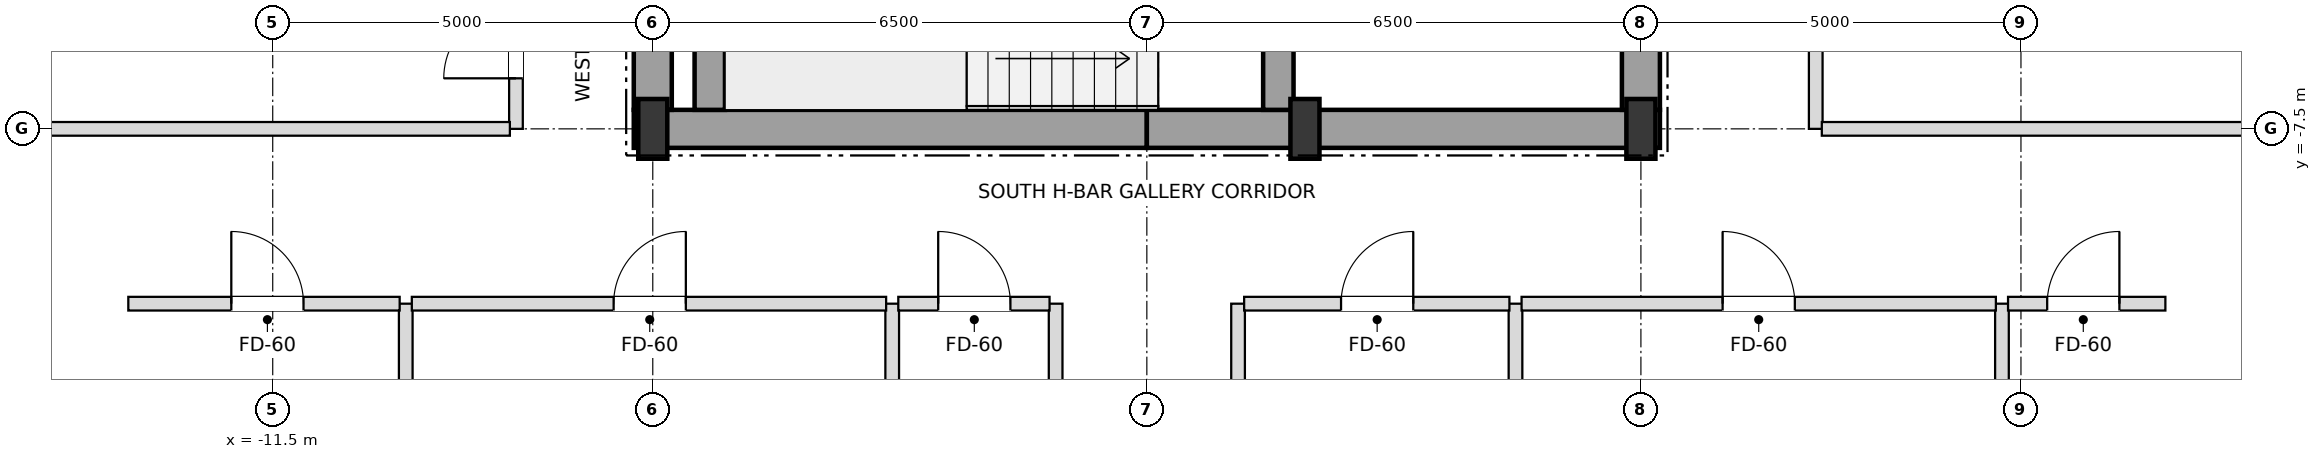
"""IFC4 building model, lengths in metres.
Left out: names, types, materials, properties, quantities, classifications, styles, units other than length and angle.
Written with IfcOpenShell. Run it as: python <this file> out.ifc"""

import sys

from ifc_helpers import new_model, si_unit, direction, frame, frame_2d, origin, origin_2d, place, context, subcontext, project, spatial, rectangle, i_section, extrude, element, fill, save


model = new_model("IFC4")
c1 = context("Model", 3, precision=1e-05, world=origin(), true_north=direction((0.0, 1.0)))
c2 = subcontext(c1, "Body", "Model", "MODEL_VIEW")
j1 = project(units=[si_unit("LENGTHUNIT", "METRE"), si_unit("PLANEANGLEUNIT", "RADIAN")], contexts=[c1])
p1 = place(None, origin())
s1 = spatial("IfcSite", under=j1, at=p1, CompositionType="ELEMENT")
p2 = place(p1, origin())
s2 = spatial("IfcBuilding", under=s1, at=p2, CompositionType="ELEMENT")
p3 = place(p2, frame((0.0, 0.0, 205.2)))
s3 = spatial("IfcBuildingStorey", under=s2, at=p3, CompositionType="ELEMENT", Elevation=205.2)
for number, where, z_axis, x_axis in (
    (1, (-6.5, -7.5, 0.0), (0.0, 0.0, 1.0), (1.0, 0.0, 0.0)),
    (2, (2.08, -7.5, 0.0), (0.0, 0.0, 1.0), (1.0, 0.0, 0.0)),
    (3, (6.5, -7.5, 0.0), (0.0, 0.0, 1.0), (1.0, 0.0, 0.0)),
):
    element("IfcColumn", number, at=place(p3, frame(where, z_axis=z_axis, x_axis=x_axis)), inside=s3, PredefinedType="COLUMN", context=c2, shape_type="SweptSolid", body=[
        extrude(i_section(OverallWidth=0.382, OverallDepth=0.786, WebThickness=0.02, FlangeThickness=0.033, at=origin_2d()), origin(), (0.0, 0.0, 1.0), 3.6),
    ])
for number, where, z_axis, x_axis in (
    (4, (-6.75, -7.5, 0.0), (0.0, 0.0, 1.0), (1.0, 0.0, 0.0)),
    (5, (0.0, -7.5, 0.0), (0.0, 0.0, 1.0), (1.0, 0.0, 0.0)),
):
    element("IfcWall", number, at=place(p3, frame(where, z_axis=z_axis, x_axis=x_axis)), inside=s3, PredefinedType="SHEAR", context=c2, shape_type="SweptSolid", body=[
        extrude(rectangle(XDim=6.75, YDim=0.5, at=frame_2d((3.375, 0.0))), origin(), (0.0, 0.0, 1.0), 3.38),
    ])
p4 = place(p3, frame((-6.5, -7.25, 0.0), z_axis=(0.0, 0.0, 1.0), x_axis=(0.0, 1.0, 0.0)))
e6 = element("IfcWall", 6, at=p4, inside=s3, PredefinedType="SHEAR", context=c2, shape_type="SweptSolid", body=[
    extrude(rectangle(XDim=3.55, YDim=0.5, at=frame_2d((1.775, 0.0))), origin(), (0.0, 0.0, 1.0), 3.38),
])
p5 = place(p3, frame((6.5, -7.25, 0.0), z_axis=(0.0, 0.0, 1.0), x_axis=(0.0, 1.0, 0.0)))
e7 = element("IfcWall", 7, at=p5, inside=s3, PredefinedType="SHEAR", context=c2, shape_type="SweptSolid", body=[
    extrude(rectangle(XDim=5.75, YDim=0.5, at=frame_2d((2.875, 0.0))), origin(), (0.0, 0.0, 1.0), 3.38),
])
p6 = place(p5, frame((0.85, 0.0, 0.0)))
e8 = element("IfcOpeningElement", 8, at=p6, cuts=e7, PredefinedType="OPENING", context=c2, shape_type="SweptSolid", body=[
    extrude(rectangle(XDim=1.05, YDim=2.15, at=frame_2d((0.525, 1.075))), frame((0.0, 0.26, 0.0), z_axis=(0.0, -1.0, 0.0), x_axis=(1.0, 0.0, 0.0)), (0.0, 0.0, 1.0), 0.52),
])
p7 = place(p3, frame((-5.75, -7.25, 0.0), z_axis=(0.0, 0.0, 1.0), x_axis=(0.0, 1.0, 0.0)))
e9 = element("IfcWall", 9, at=p7, inside=s3, PredefinedType="SHEAR", context=c2, shape_type="SweptSolid", body=[
    extrude(rectangle(XDim=2.9, YDim=0.4, at=frame_2d((1.45, 0.0))), origin(), (0.0, 0.0, 1.0), 3.38),
])
p8 = place(p3, frame((1.73, -7.25, 0.0), z_axis=(0.0, 0.0, 1.0), x_axis=(0.0, 1.0, 0.0)))
e10 = element("IfcWall", 10, at=p8, inside=s3, PredefinedType="SHEAR", context=c2, shape_type="SweptSolid", body=[
    extrude(rectangle(XDim=3.3, YDim=0.4, at=frame_2d((1.65, 0.0))), origin(), (0.0, 0.0, 1.0), 3.38),
])
p9 = place(p8, frame((0.9, 0.0, 0.0)))
e11 = element("IfcOpeningElement", 11, at=p9, cuts=e10, PredefinedType="OPENING", context=c2, shape_type="SweptSolid", body=[
    extrude(rectangle(XDim=1.05, YDim=2.15, at=frame_2d((0.525, 1.075))), frame((0.0, 0.21, 0.0), z_axis=(0.0, -1.0, 0.0), x_axis=(1.0, 0.0, 0.0)), (0.0, 0.0, 1.0), 0.42),
])
p10 = place(p3, frame((-9.75, -21.4, 0.0), z_axis=(0.0, 0.0, 1.0), x_axis=(0.0, 1.0, 0.0)))
e12 = element("IfcWall", 12, at=p10, inside=s3, PredefinedType="PARTITIONING", context=c2, shape_type="SweptSolid", body=[
    extrude(rectangle(XDim=11.6, YDim=0.18, at=frame_2d((5.8, 0.0))), origin(), (0.0, 0.0, 1.0), 2.826),
])
p11 = place(p3, frame((-8.3, -7.5, 0.0), z_axis=(0.0, 0.0, 1.0), x_axis=(0.0, 1.0, 0.0)))
e13 = element("IfcWall", 13, at=p11, inside=s3, PredefinedType="PARTITIONING", context=c2, shape_type="SweptSolid", body=[
    extrude(rectangle(XDim=15.0, YDim=0.18, at=frame_2d((7.5, 0.0))), origin(), (0.0, 0.0, 1.0), 3.38),
])
p12 = place(p11, frame((0.665, 0.0, 0.0)))
e14 = element("IfcOpeningElement", 14, at=p12, cuts=e13, PredefinedType="OPENING", context=c2, shape_type="SweptSolid", body=[
    extrude(rectangle(XDim=0.95, YDim=2.15, at=frame_2d((0.475, 1.075))), frame((0.0, 0.1, 0.0), z_axis=(0.0, -1.0, 0.0), x_axis=(1.0, 0.0, 0.0)), (0.0, 0.0, 1.0), 0.2),
])
p13 = place(p11, frame((2.665, 0.0, 0.0)))
e15 = element("IfcOpeningElement", 15, at=p13, cuts=e13, PredefinedType="OPENING", context=c2, shape_type="SweptSolid", body=[
    extrude(rectangle(XDim=0.95, YDim=2.15, at=frame_2d((0.475, 1.075))), frame((0.0, 0.1, 0.0), z_axis=(0.0, -1.0, 0.0), x_axis=(1.0, 0.0, 0.0)), (0.0, 0.0, 1.0), 0.2),
])
for number, where, z_axis, x_axis in (
    (16, (-3.35, -21.4, 0.0), (0.0, 0.0, 1.0), (0.0, 1.0, 0.0)),
    (17, (-1.2, -21.4, 0.0), (0.0, 0.0, 1.0), (0.0, 1.0, 0.0)),
    (18, (1.2, -21.4, 0.0), (0.0, 0.0, 1.0), (0.0, 1.0, 0.0)),
    (19, (4.85, -21.4, 0.0), (0.0, 0.0, 1.0), (0.0, 1.0, 0.0)),
):
    element("IfcWall", number, at=place(p3, frame(where, z_axis=z_axis, x_axis=x_axis)), inside=s3, PredefinedType="PARTITIONING", context=c2, shape_type="SweptSolid", body=[
        extrude(rectangle(XDim=11.6, YDim=0.18, at=frame_2d((5.8, 0.0))), origin(), (0.0, 0.0, 1.0), 2.826),
    ])
p14 = place(p3, frame((8.8, -7.5, 0.0), z_axis=(0.0, 0.0, 1.0), x_axis=(0.0, 1.0, 0.0)))
e20 = element("IfcWall", 20, at=p14, inside=s3, PredefinedType="PARTITIONING", context=c2, shape_type="SweptSolid", body=[
    extrude(rectangle(XDim=15.0, YDim=0.18, at=frame_2d((7.5, 0.0))), origin(), (0.0, 0.0, 1.0), 3.38),
])
p15 = place(p14, frame((2.075, 0.0, 0.0)))
e21 = element("IfcOpeningElement", 21, at=p15, cuts=e20, PredefinedType="OPENING", context=c2, shape_type="SweptSolid", body=[
    extrude(rectangle(XDim=0.95, YDim=2.15, at=frame_2d((0.475, 1.075))), frame((0.0, 0.1, 0.0), z_axis=(0.0, -1.0, 0.0), x_axis=(1.0, 0.0, 0.0)), (0.0, 0.0, 1.0), 0.2),
])
p16 = place(p14, frame((8.325, 0.0, 0.0)))
e22 = element("IfcOpeningElement", 22, at=p16, cuts=e20, PredefinedType="OPENING", context=c2, shape_type="SweptSolid", body=[
    extrude(rectangle(XDim=0.95, YDim=2.15, at=frame_2d((0.475, 1.075))), frame((0.0, 0.1, 0.0), z_axis=(0.0, -1.0, 0.0), x_axis=(1.0, 0.0, 0.0)), (0.0, 0.0, 1.0), 0.2),
])
p17 = place(p14, frame((13.275, 0.0, 0.0)))
e23 = element("IfcOpeningElement", 23, at=p17, cuts=e20, PredefinedType="OPENING", context=c2, shape_type="SweptSolid", body=[
    extrude(rectangle(XDim=0.95, YDim=2.15, at=frame_2d((0.475, 1.075))), frame((0.0, 0.1, 0.0), z_axis=(0.0, -1.0, 0.0), x_axis=(1.0, 0.0, 0.0)), (0.0, 0.0, 1.0), 0.2),
])
p18 = place(p3, frame((11.25, -21.4, 0.0), z_axis=(0.0, 0.0, 1.0), x_axis=(0.0, 1.0, 0.0)))
e24 = element("IfcWall", 24, at=p18, inside=s3, PredefinedType="PARTITIONING", context=c2, shape_type="SweptSolid", body=[
    extrude(rectangle(XDim=11.6, YDim=0.18, at=frame_2d((5.8, 0.0))), origin(), (0.0, 0.0, 1.0), 2.826),
])
p19 = place(p3, frame((-13.4, -9.8, 0.0), z_axis=(0.0, 0.0, 1.0), x_axis=(1.0, 0.0, 0.0)))
e25 = element("IfcWall", 25, at=p19, inside=s3, PredefinedType="PARTITIONING", context=c2, shape_type="SweptSolid", body=[
    extrude(rectangle(XDim=3.57, YDim=0.18, at=frame_2d((1.785, 0.0))), origin(), (0.0, 0.0, 1.0), 3.38),
])
p20 = place(p19, frame((1.355, 0.0, 0.0)))
e26 = element("IfcOpeningElement", 26, at=p20, cuts=e25, PredefinedType="OPENING", context=c2, shape_type="SweptSolid", body=[
    extrude(rectangle(XDim=0.95, YDim=2.15, at=frame_2d((0.475, 1.075))), frame((0.0, 0.1, 0.0), z_axis=(0.0, -1.0, 0.0), x_axis=(1.0, 0.0, 0.0)), (0.0, 0.0, 1.0), 0.2),
])
p21 = place(p3, frame((-9.67, -9.8, 0.0), z_axis=(0.0, 0.0, 1.0), x_axis=(1.0, 0.0, 0.0)))
e27 = element("IfcWall", 27, at=p21, inside=s3, PredefinedType="PARTITIONING", context=c2, shape_type="SweptSolid", body=[
    extrude(rectangle(XDim=6.24, YDim=0.18, at=frame_2d((3.12, 0.0))), origin(), (0.0, 0.0, 1.0), 2.826),
])
p22 = place(p21, frame((2.655, 0.0, 0.0)))
e28 = element("IfcOpeningElement", 28, at=p22, cuts=e27, PredefinedType="OPENING", context=c2, shape_type="SweptSolid", body=[
    extrude(rectangle(XDim=0.95, YDim=2.15, at=frame_2d((0.475, 1.075))), frame((0.0, 0.1, 0.0), z_axis=(0.0, -1.0, 0.0), x_axis=(1.0, 0.0, 0.0)), (0.0, 0.0, 1.0), 0.2),
])
p23 = place(p3, frame((-3.27, -9.8, 0.0), z_axis=(0.0, 0.0, 1.0), x_axis=(1.0, 0.0, 0.0)))
e29 = element("IfcWall", 29, at=p23, inside=s3, PredefinedType="PARTITIONING", context=c2, shape_type="SweptSolid", body=[
    extrude(rectangle(XDim=1.99, YDim=0.18, at=frame_2d((0.995, 0.0))), origin(), (0.0, 0.0, 1.0), 3.38),
])
p24 = place(p23, frame((0.525, 0.0, 0.0)))
e30 = element("IfcOpeningElement", 30, at=p24, cuts=e29, PredefinedType="OPENING", context=c2, shape_type="SweptSolid", body=[
    extrude(rectangle(XDim=0.95, YDim=2.15, at=frame_2d((0.475, 1.075))), frame((0.0, 0.1, 0.0), z_axis=(0.0, -1.0, 0.0), x_axis=(1.0, 0.0, 0.0)), (0.0, 0.0, 1.0), 0.2),
])
p25 = place(p3, frame((1.28, -9.8, 0.0), z_axis=(0.0, 0.0, 1.0), x_axis=(1.0, 0.0, 0.0)))
e31 = element("IfcWall", 31, at=p25, inside=s3, PredefinedType="PARTITIONING", context=c2, shape_type="SweptSolid", body=[
    extrude(rectangle(XDim=3.49, YDim=0.18, at=frame_2d((1.745, 0.0))), origin(), (0.0, 0.0, 1.0), 3.38),
])
p26 = place(p25, frame((1.275, 0.0, 0.0)))
e32 = element("IfcOpeningElement", 32, at=p26, cuts=e31, PredefinedType="OPENING", context=c2, shape_type="SweptSolid", body=[
    extrude(rectangle(XDim=0.95, YDim=2.15, at=frame_2d((0.475, 1.075))), frame((0.0, 0.1, 0.0), z_axis=(0.0, -1.0, 0.0), x_axis=(1.0, 0.0, 0.0)), (0.0, 0.0, 1.0), 0.2),
])
p27 = place(p3, frame((4.93, -9.8, 0.0), z_axis=(0.0, 0.0, 1.0), x_axis=(1.0, 0.0, 0.0)))
e33 = element("IfcWall", 33, at=p27, inside=s3, PredefinedType="PARTITIONING", context=c2, shape_type="SweptSolid", body=[
    extrude(rectangle(XDim=6.24, YDim=0.18, at=frame_2d((3.12, 0.0))), origin(), (0.0, 0.0, 1.0), 2.826),
])
p28 = place(p27, frame((2.645, 0.0, 0.0)))
e34 = element("IfcOpeningElement", 34, at=p28, cuts=e33, PredefinedType="OPENING", context=c2, shape_type="SweptSolid", body=[
    extrude(rectangle(XDim=0.95, YDim=2.15, at=frame_2d((0.475, 1.075))), frame((0.0, 0.1, 0.0), z_axis=(0.0, -1.0, 0.0), x_axis=(1.0, 0.0, 0.0)), (0.0, 0.0, 1.0), 0.2),
])
p29 = place(p3, frame((11.33, -9.8, 0.0), z_axis=(0.0, 0.0, 1.0), x_axis=(1.0, 0.0, 0.0)))
e35 = element("IfcWall", 35, at=p29, inside=s3, PredefinedType="PARTITIONING", context=c2, shape_type="SweptSolid", body=[
    extrude(rectangle(XDim=2.07, YDim=0.18, at=frame_2d((1.035, 0.0))), origin(), (0.0, 0.0, 1.0), 3.38),
])
p30 = place(p29, frame((0.515, 0.0, 0.0)))
e36 = element("IfcOpeningElement", 36, at=p30, cuts=e35, PredefinedType="OPENING", context=c2, shape_type="SweptSolid", body=[
    extrude(rectangle(XDim=0.95, YDim=2.15, at=frame_2d((0.475, 1.075))), frame((0.0, 0.1, 0.0), z_axis=(0.0, -1.0, 0.0), x_axis=(1.0, 0.0, 0.0)), (0.0, 0.0, 1.0), 0.2),
])
p31 = place(p3, frame((-18.4, -7.5, 0.0), z_axis=(0.0, 0.0, 1.0), x_axis=(1.0, 0.0, 0.0)))
e37 = element("IfcWall", 37, at=p31, inside=s3, PredefinedType="PARTITIONING", context=c2, shape_type="SweptSolid", body=[
    extrude(rectangle(XDim=10.02, YDim=0.18, at=frame_2d((5.01, 0.0))), origin(), (0.0, 0.0, 1.0), 2.826),
])
p32 = place(p3, frame((8.88, -7.5, 0.0), z_axis=(0.0, 0.0, 1.0), x_axis=(1.0, 0.0, 0.0)))
e38 = element("IfcWall", 38, at=p32, inside=s3, PredefinedType="PARTITIONING", context=c2, shape_type="SweptSolid", body=[
    extrude(rectangle(XDim=9.52, YDim=0.18, at=frame_2d((4.76, 0.0))), origin(), (0.0, 0.0, 1.0), 2.826),
])
p33 = place(p20, origin())
e39 = element("IfcDoor", 39, at=p33, inside=s3, OperationType="SINGLE_SWING_LEFT", PredefinedType="DOOR", context=c2, shape_type="SweptSolid", body=[
    extrude(rectangle(XDim=0.95, YDim=2.15, at=frame_2d((0.475, 1.075))), frame((0.0, 0.025, 0.0), z_axis=(0.0, -1.0, 0.0), x_axis=(1.0, 0.0, 0.0)), (0.0, 0.0, 1.0), 0.05),
])
fill(e26, e39)
p34 = place(p22, origin())
e40 = element("IfcDoor", 40, at=p34, inside=s3, OperationType="SINGLE_SWING_RIGHT", PredefinedType="DOOR", context=c2, shape_type="SweptSolid", body=[
    extrude(rectangle(XDim=0.95, YDim=2.15, at=frame_2d((0.475, 1.075))), frame((0.0, 0.025, 0.0), z_axis=(0.0, -1.0, 0.0), x_axis=(1.0, 0.0, 0.0)), (0.0, 0.0, 1.0), 0.05),
])
fill(e28, e40)
p35 = place(p24, origin())
e41 = element("IfcDoor", 41, at=p35, inside=s3, OperationType="SINGLE_SWING_LEFT", PredefinedType="DOOR", context=c2, shape_type="SweptSolid", body=[
    extrude(rectangle(XDim=0.95, YDim=2.15, at=frame_2d((0.475, 1.075))), frame((0.0, 0.025, 0.0), z_axis=(0.0, -1.0, 0.0), x_axis=(1.0, 0.0, 0.0)), (0.0, 0.0, 1.0), 0.05),
])
fill(e30, e41)
p36 = place(p26, origin())
e42 = element("IfcDoor", 42, at=p36, inside=s3, OperationType="SINGLE_SWING_RIGHT", PredefinedType="DOOR", context=c2, shape_type="SweptSolid", body=[
    extrude(rectangle(XDim=0.95, YDim=2.15, at=frame_2d((0.475, 1.075))), frame((0.0, 0.025, 0.0), z_axis=(0.0, -1.0, 0.0), x_axis=(1.0, 0.0, 0.0)), (0.0, 0.0, 1.0), 0.05),
])
fill(e32, e42)
p37 = place(p28, origin())
e43 = element("IfcDoor", 43, at=p37, inside=s3, OperationType="SINGLE_SWING_LEFT", PredefinedType="DOOR", context=c2, shape_type="SweptSolid", body=[
    extrude(rectangle(XDim=0.95, YDim=2.15, at=frame_2d((0.475, 1.075))), frame((0.0, 0.025, 0.0), z_axis=(0.0, -1.0, 0.0), x_axis=(1.0, 0.0, 0.0)), (0.0, 0.0, 1.0), 0.05),
])
fill(e34, e43)
p38 = place(p30, origin())
e44 = element("IfcDoor", 44, at=p38, inside=s3, OperationType="SINGLE_SWING_RIGHT", PredefinedType="DOOR", context=c2, shape_type="SweptSolid", body=[
    extrude(rectangle(XDim=0.95, YDim=2.15, at=frame_2d((0.475, 1.075))), frame((0.0, 0.025, 0.0), z_axis=(0.0, -1.0, 0.0), x_axis=(1.0, 0.0, 0.0)), (0.0, 0.0, 1.0), 0.05),
])
fill(e36, e44)
p39 = place(p12, origin())
e45 = element("IfcDoor", 45, at=p39, inside=s3, OperationType="SINGLE_SWING_LEFT", PredefinedType="DOOR", context=c2, shape_type="SweptSolid", body=[
    extrude(rectangle(XDim=0.95, YDim=2.15, at=frame_2d((0.475, 1.075))), frame((0.0, 0.025, 0.0), z_axis=(0.0, -1.0, 0.0), x_axis=(1.0, 0.0, 0.0)), (0.0, 0.0, 1.0), 0.05),
])
fill(e14, e45)
save(model, sys.argv[1])
